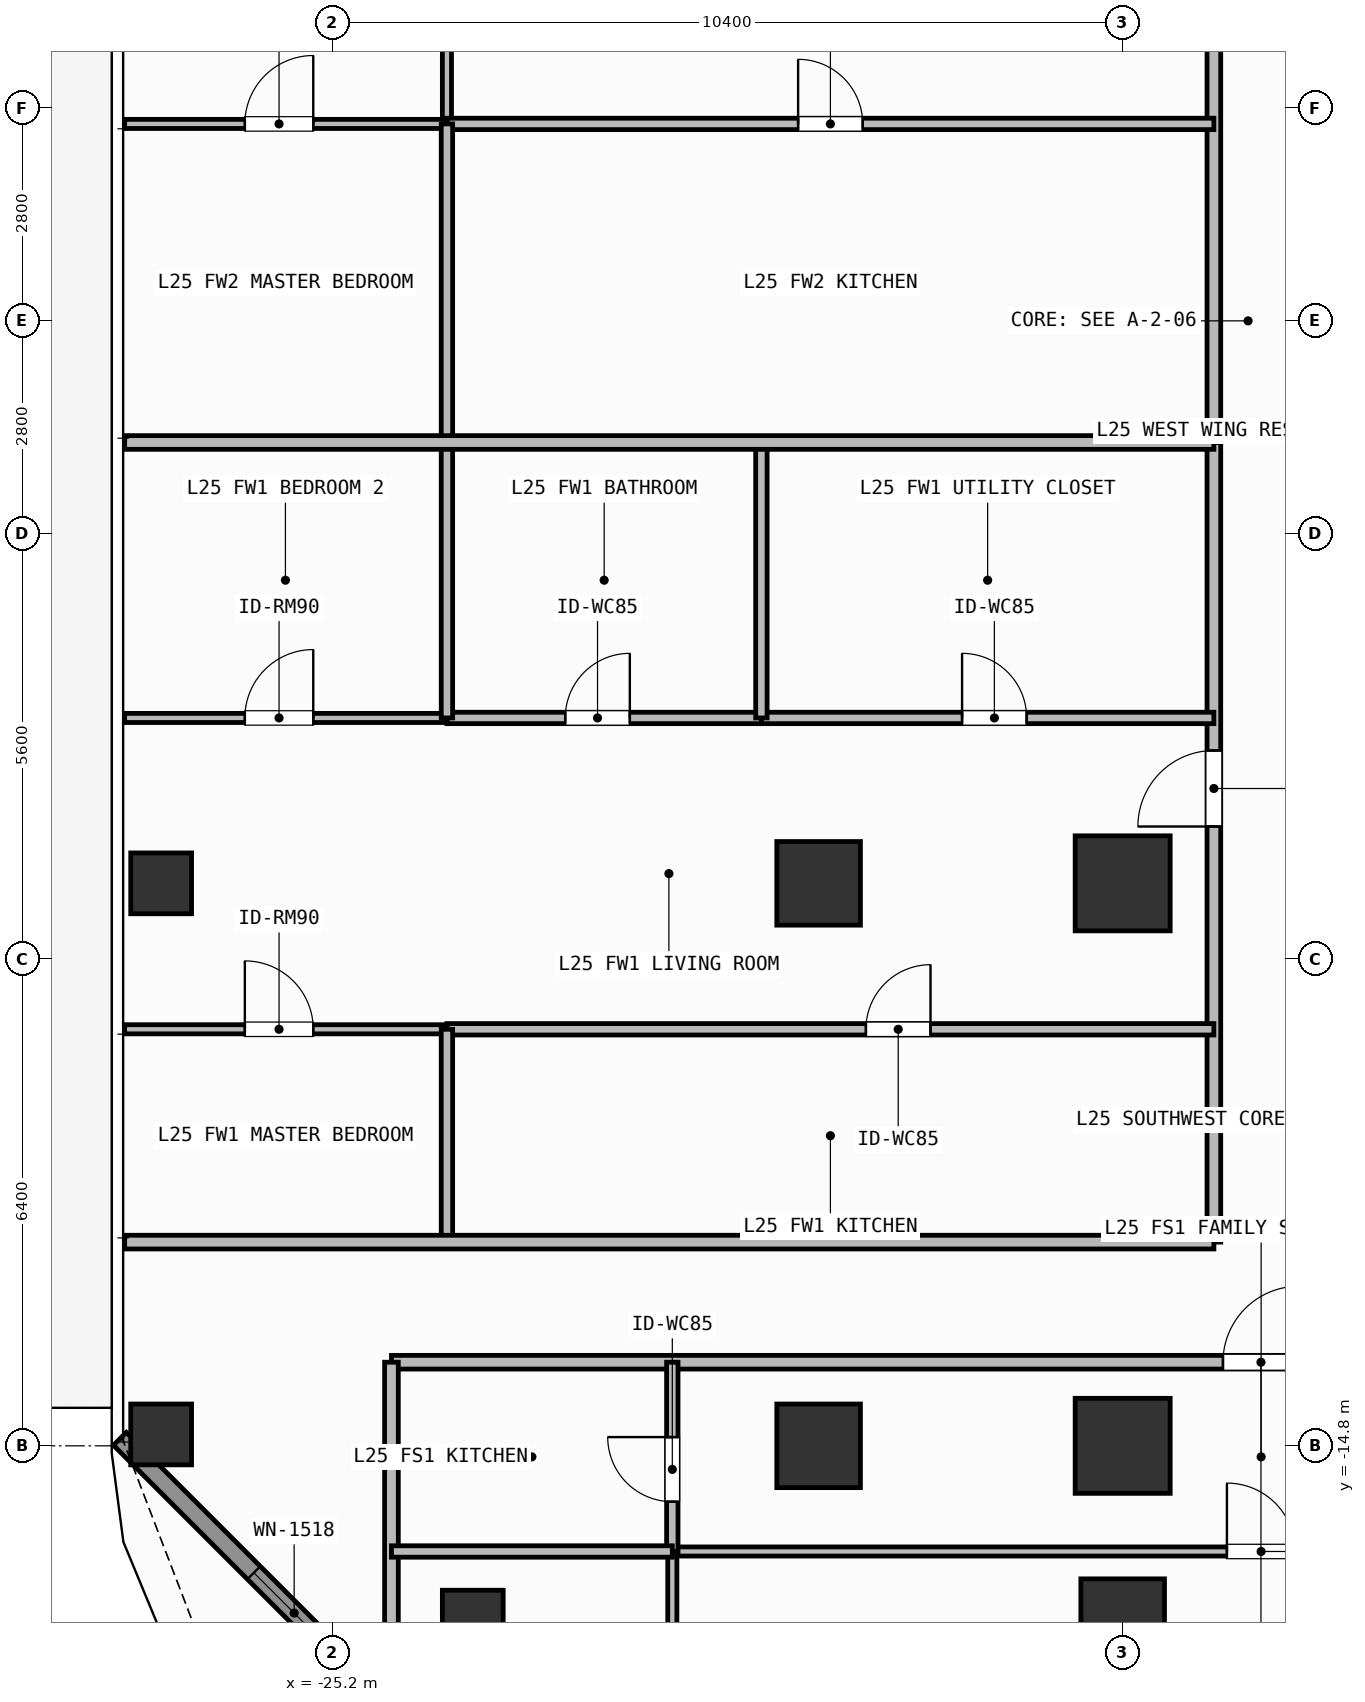
"""IFC4 building model, lengths in metres.
Left out: names, types, materials, properties, quantities, classifications, styles, units other than length and angle.
Written with IfcOpenShell. Run it as: python <this file> out.ifc"""

import sys

from ifc_helpers import new_model, si_unit, direction, frame, frame_2d, origin, origin_2d, place, context, subcontext, project, spatial, rectangle, hollow_rectangle, extrude, element, fill, save


model = new_model("IFC4")
c1 = context("Model", 3, precision=1e-05, world=origin(), true_north=direction((0.0, 1.0)))
c2 = subcontext(c1, "Body", "Model", "MODEL_VIEW")
j1 = project(units=[si_unit("LENGTHUNIT", "METRE"), si_unit("PLANEANGLEUNIT", "RADIAN")], contexts=[c1])
p1 = place(None, origin())
s1 = spatial("IfcSite", under=j1, at=p1, CompositionType="ELEMENT")
p2 = place(p1, origin())
s2 = spatial("IfcBuilding", under=s1, at=p2, CompositionType="ELEMENT")
p3 = place(p2, frame((0.0, 0.0, 100.8)))
s3 = spatial("IfcBuildingStorey", under=s2, at=p3, CompositionType="ELEMENT", Elevation=100.8)
for number, where, z_axis, x_axis in (
    (1, (-14.8, -14.8, 0.0), (0.0, 0.0, 1.0), (1.0, 0.0, 0.0)),
    (2, (-14.8, -7.4, 0.0), (0.0, 0.0, 1.0), (1.0, 0.0, 0.0)),
):
    element("IfcColumn", number, at=place(p3, frame(where, z_axis=z_axis, x_axis=x_axis)), inside=s3, PredefinedType="COLUMN", context=c2, shape_type="SweptSolid", body=[
        extrude(rectangle(XDim=1.25, YDim=1.25, at=origin_2d()), origin(), (0.0, 0.0, 1.0), 3.9),
    ])
for number, where, z_axis, x_axis in (
    (3, (-18.8, -14.8, 0.0), (0.0, 0.0, 1.0), (1.0, 0.0, 0.0)),
    (4, (-18.8, -7.4, 0.0), (0.0, 0.0, 1.0), (1.0, 0.0, 0.0)),
    (5, (-14.8, -17.1, 0.0), (0.0, 0.0, 1.0), (1.0, 0.0, 0.0)),
):
    element("IfcColumn", number, at=place(p3, frame(where, z_axis=z_axis, x_axis=x_axis)), inside=s3, PredefinedType="COLUMN", context=c2, shape_type="SweptSolid", body=[
        extrude(rectangle(XDim=1.1, YDim=1.1, at=origin_2d()), origin(), (0.0, 0.0, 1.0), 3.9),
    ])
for number, where, z_axis, x_axis in (
    (6, (-23.35, -17.1, 0.0), (0.0, 0.0, 1.0), (1.0, 0.0, 0.0)),
    (7, (-27.45, -14.65, 0.0), (0.0, 0.0, 1.0), (1.0, 0.0, 0.0)),
    (8, (-27.45, -7.4, 0.0), (0.0, 0.0, 1.0), (1.0, 0.0, 0.0)),
):
    element("IfcColumn", number, at=place(p3, frame(where, z_axis=z_axis, x_axis=x_axis)), inside=s3, PredefinedType="COLUMN", context=c2, shape_type="SweptSolid", body=[
        extrude(hollow_rectangle(XDim=0.8, YDim=0.8, WallThickness=0.036, at=origin_2d()), origin(), (0.0, 0.0, 1.0), 3.9),
    ])
p4 = place(p3, frame((-23.408, -19.292, 0.0), z_axis=(0.0, 0.0, 1.0), x_axis=(-0.707087954376, 0.707125607496, 0.0)))
e9 = element("IfcWall", 9, at=p4, inside=s3, PredefinedType="SOLIDWALL", context=c2, shape_type="SweptSolid", body=[
    extrude(rectangle(XDim=6.484, YDim=0.24, at=frame_2d((3.242, 0.0))), origin(), (0.0, 0.0, 1.0), 3.68),
])
p5 = place(p4, frame((2.492, 0.0, 0.8)))
e10 = element("IfcOpeningElement", 10, at=p5, cuts=e9, PredefinedType="OPENING", context=c2, shape_type="SweptSolid", body=[
    extrude(rectangle(XDim=1.5, YDim=1.85, at=frame_2d((0.75, 0.925))), frame((0.0, 0.13, 0.0), z_axis=(0.0, -1.0, 0.0), x_axis=(1.0, 0.0, 0.0)), (0.0, 0.0, 1.0), 0.26),
])
p6 = place(p3, frame((-24.42, -13.7, 0.0), z_axis=(0.0, 0.0, 1.0), x_axis=(1.0, 0.0, 0.0)))
e11 = element("IfcWall", 11, at=p6, inside=s3, PredefinedType="PARTITIONING", context=c2, shape_type="SweptSolid", body=[
    extrude(rectangle(XDim=25.394, YDim=0.18, at=frame_2d((12.697, 0.0))), origin(), (0.0, 0.0, 1.0), 3.68),
])
p7 = place(p6, frame((10.939, 0.0, 0.0)))
e12 = element("IfcOpeningElement", 12, at=p7, cuts=e11, PredefinedType="OPENING", context=c2, shape_type="SweptSolid", body=[
    extrude(rectangle(XDim=1.0, YDim=2.2, at=frame_2d((0.5, 1.1))), frame((0.0, 0.1, 0.0), z_axis=(0.0, -1.0, 0.0), x_axis=(1.0, 0.0, 0.0)), (0.0, 0.0, 1.0), 0.2),
])
p8 = place(p3, frame((-20.725, -16.19, 0.0), z_axis=(0.0, 0.0, 1.0), x_axis=(1.0, 0.0, 0.0)))
e13 = element("IfcWall", 13, at=p8, inside=s3, PredefinedType="PARTITIONING", context=c2, shape_type="SweptSolid", body=[
    extrude(rectangle(XDim=15.493, YDim=0.12, at=frame_2d((7.747, 0.0))), origin(), (0.0, 0.0, 1.0), 3.68),
])
p9 = place(p8, frame((7.296, 0.0, 0.0)))
e14 = element("IfcOpeningElement", 14, at=p9, cuts=e13, PredefinedType="OPENING", context=c2, shape_type="SweptSolid", body=[
    extrude(rectangle(XDim=0.9, YDim=2.1, at=frame_2d((0.45, 1.05))), frame((0.0, 0.07, 0.0), z_axis=(0.0, -1.0, 0.0), x_axis=(1.0, 0.0, 0.0)), (0.0, 0.0, 1.0), 0.14),
])
p10 = place(p3, frame((-20.725, -16.19, 0.0), z_axis=(0.0, 0.0, 1.0), x_axis=(0.0, 1.0, 0.0)))
e15 = element("IfcWall", 15, at=p10, inside=s3, PredefinedType="PARTITIONING", context=c2, shape_type="SweptSolid", body=[
    extrude(rectangle(XDim=2.49, YDim=0.15, at=frame_2d((1.245, 0.0))), origin(), (0.0, 0.0, 1.0), 3.68),
])
p11 = place(p10, frame((0.655, 0.0, 0.0)))
e16 = element("IfcOpeningElement", 16, at=p11, cuts=e15, PredefinedType="OPENING", context=c2, shape_type="SweptSolid", body=[
    extrude(rectangle(XDim=0.85, YDim=2.1, at=frame_2d((0.425, 1.05))), frame((0.0, 0.085, 0.0), z_axis=(0.0, -1.0, 0.0), x_axis=(1.0, 0.0, 0.0)), (0.0, 0.0, 1.0), 0.17),
])
p12 = place(p3, frame((-20.725, -19.23, 0.0), z_axis=(0.0, 0.0, 1.0), x_axis=(0.0, 1.0, 0.0)))
e17 = element("IfcWall", 17, at=p12, inside=s3, PredefinedType="PARTITIONING", context=c2, shape_type="SweptSolid", body=[
    extrude(rectangle(XDim=3.04, YDim=0.12, at=frame_2d((1.52, 0.0))), origin(), (0.0, 0.0, 1.0), 3.68),
])
p13 = place(p12, frame((1.153, 0.0, 0.0)))
e18 = element("IfcOpeningElement", 18, at=p13, cuts=e17, PredefinedType="OPENING", context=c2, shape_type="SweptSolid", body=[
    extrude(rectangle(XDim=0.9, YDim=2.1, at=frame_2d((0.45, 1.05))), frame((0.0, 0.07, 0.0), z_axis=(0.0, -1.0, 0.0), x_axis=(1.0, 0.0, 0.0)), (0.0, 0.0, 1.0), 0.14),
])
p14 = place(p3, frame((-13.6, -12.12, 0.0), z_axis=(0.0, 0.0, 1.0), x_axis=(0.0, 1.0, 0.0)))
e19 = element("IfcWall", 19, at=p14, inside=s3, PredefinedType="PARTITIONING", context=c2, shape_type="SweptSolid", body=[
    extrude(rectangle(XDim=10.52, YDim=0.18, at=frame_2d((5.26, 0.0))), origin(), (0.0, 0.0, 1.0), 3.68),
])
p15 = place(p14, frame((5.468, 0.0, 0.0)))
e20 = element("IfcOpeningElement", 20, at=p15, cuts=e19, PredefinedType="OPENING", context=c2, shape_type="SweptSolid", body=[
    extrude(rectangle(XDim=1.0, YDim=2.2, at=frame_2d((0.5, 1.1))), frame((0.0, 0.1, 0.0), z_axis=(0.0, -1.0, 0.0), x_axis=(1.0, 0.0, 0.0)), (0.0, 0.0, 1.0), 0.2),
])
p16 = place(p3, frame((-23.69, -5.224, 0.0), z_axis=(0.0, 0.0, 1.0), x_axis=(1.0, 0.0, 0.0)))
e21 = element("IfcWall", 21, at=p16, inside=s3, PredefinedType="PARTITIONING", context=c2, shape_type="SweptSolid", body=[
    extrude(rectangle(XDim=4.137, YDim=0.15, at=frame_2d((2.068, 0.0))), origin(), (0.0, 0.0, 1.0), 3.68),
])
p17 = place(p16, frame((1.556, 0.0, 0.0)))
e22 = element("IfcOpeningElement", 22, at=p17, cuts=e21, PredefinedType="OPENING", context=c2, shape_type="SweptSolid", body=[
    extrude(rectangle(XDim=0.85, YDim=2.1, at=frame_2d((0.425, 1.05))), frame((0.0, 0.085, 0.0), z_axis=(0.0, -1.0, 0.0), x_axis=(1.0, 0.0, 0.0)), (0.0, 0.0, 1.0), 0.17),
])
p18 = place(p3, frame((-19.553, -5.224, 0.0), z_axis=(0.0, 0.0, 1.0), x_axis=(1.0, 0.0, 0.0)))
e23 = element("IfcWall", 23, at=p18, inside=s3, PredefinedType="PARTITIONING", context=c2, shape_type="SweptSolid", body=[
    extrude(rectangle(XDim=5.953, YDim=0.15, at=frame_2d((2.977, 0.0))), origin(), (0.0, 0.0, 1.0), 3.68),
])
p19 = place(p18, frame((2.64, 0.0, 0.0)))
e24 = element("IfcOpeningElement", 24, at=p19, cuts=e23, PredefinedType="OPENING", context=c2, shape_type="SweptSolid", body=[
    extrude(rectangle(XDim=0.85, YDim=2.1, at=frame_2d((0.425, 1.05))), frame((0.0, 0.085, 0.0), z_axis=(0.0, -1.0, 0.0), x_axis=(1.0, 0.0, 0.0)), (0.0, 0.0, 1.0), 0.17),
])
p20 = place(p3, frame((-23.69, -9.32, 0.0), z_axis=(0.0, 0.0, 1.0), x_axis=(1.0, 0.0, 0.0)))
e25 = element("IfcWall", 25, at=p20, inside=s3, PredefinedType="PARTITIONING", context=c2, shape_type="SweptSolid", body=[
    extrude(rectangle(XDim=10.09, YDim=0.15, at=frame_2d((5.045, 0.0))), origin(), (0.0, 0.0, 1.0), 3.68),
])
p21 = place(p20, frame((5.512, 0.0, 0.0)))
e26 = element("IfcOpeningElement", 26, at=p21, cuts=e25, PredefinedType="OPENING", context=c2, shape_type="SweptSolid", body=[
    extrude(rectangle(XDim=0.85, YDim=2.1, at=frame_2d((0.425, 1.05))), frame((0.0, 0.085, 0.0), z_axis=(0.0, -1.0, 0.0), x_axis=(1.0, 0.0, 0.0)), (0.0, 0.0, 1.0), 0.17),
])
p22 = place(p3, frame((-27.93, -9.32, 0.0), z_axis=(0.0, 0.0, 1.0), x_axis=(1.0, 0.0, 0.0)))
e27 = element("IfcWall", 27, at=p22, inside=s3, PredefinedType="PARTITIONING", context=c2, shape_type="SweptSolid", body=[
    extrude(rectangle(XDim=4.24, YDim=0.12, at=frame_2d((2.12, 0.0))), origin(), (0.0, 0.0, 1.0), 3.68),
])
p23 = place(p22, frame((1.581, 0.0, 0.0)))
e28 = element("IfcOpeningElement", 28, at=p23, cuts=e27, PredefinedType="OPENING", context=c2, shape_type="SweptSolid", body=[
    extrude(rectangle(XDim=0.9, YDim=2.1, at=frame_2d((0.45, 1.05))), frame((0.0, 0.07, 0.0), z_axis=(0.0, -1.0, 0.0), x_axis=(1.0, 0.0, 0.0)), (0.0, 0.0, 1.0), 0.14),
])
p24 = place(p3, frame((-27.93, -5.224, 0.0), z_axis=(0.0, 0.0, 1.0), x_axis=(1.0, 0.0, 0.0)))
e29 = element("IfcWall", 29, at=p24, inside=s3, PredefinedType="PARTITIONING", context=c2, shape_type="SweptSolid", body=[
    extrude(rectangle(XDim=4.24, YDim=0.12, at=frame_2d((2.12, 0.0))), origin(), (0.0, 0.0, 1.0), 3.68),
])
p25 = place(p24, frame((1.581, 0.0, 0.0)))
e30 = element("IfcOpeningElement", 30, at=p25, cuts=e29, PredefinedType="OPENING", context=c2, shape_type="SweptSolid", body=[
    extrude(rectangle(XDim=0.9, YDim=2.1, at=frame_2d((0.45, 1.05))), frame((0.0, 0.07, 0.0), z_axis=(0.0, -1.0, 0.0), x_axis=(1.0, 0.0, 0.0)), (0.0, 0.0, 1.0), 0.14),
])
p26 = place(p3, frame((-13.6, -1.6, 0.0), z_axis=(0.0, 0.0, 1.0), x_axis=(0.0, 1.0, 0.0)))
e31 = element("IfcWall", 31, at=p26, inside=s3, PredefinedType="PARTITIONING", context=c2, shape_type="SweptSolid", body=[
    extrude(rectangle(XDim=13.72, YDim=0.18, at=frame_2d((6.86, 0.0))), origin(), (0.0, 0.0, 1.0), 3.68),
])
p27 = place(p26, frame((6.989, 0.0, 0.0)))
e32 = element("IfcOpeningElement", 32, at=p27, cuts=e31, PredefinedType="OPENING", context=c2, shape_type="SweptSolid", body=[
    extrude(rectangle(XDim=1.0, YDim=2.2, at=frame_2d((0.5, 1.1))), frame((0.0, 0.1, 0.0), z_axis=(0.0, -1.0, 0.0), x_axis=(1.0, 0.0, 0.0)), (0.0, 0.0, 1.0), 0.2),
])
p28 = place(p3, frame((-23.69, 2.591, 0.0), z_axis=(0.0, 0.0, 1.0), x_axis=(0.0, 1.0, 0.0)))
e33 = element("IfcWall", 33, at=p28, inside=s3, PredefinedType="PARTITIONING", context=c2, shape_type="SweptSolid", body=[
    extrude(rectangle(XDim=6.729, YDim=0.12, at=frame_2d((3.365, 0.0))), origin(), (0.0, 0.0, 1.0), 3.68),
])
p29 = place(p28, frame((2.826, 0.0, 0.0)))
e34 = element("IfcOpeningElement", 34, at=p29, cuts=e33, PredefinedType="OPENING", context=c2, shape_type="SweptSolid", body=[
    extrude(rectangle(XDim=0.9, YDim=2.1, at=frame_2d((0.45, 1.05))), frame((0.0, 0.07, 0.0), z_axis=(0.0, -1.0, 0.0), x_axis=(1.0, 0.0, 0.0)), (0.0, 0.0, 1.0), 0.14),
])
p30 = place(p3, frame((-23.69, 2.591, 0.0), z_axis=(0.0, 0.0, 1.0), x_axis=(1.0, 0.0, 0.0)))
e35 = element("IfcWall", 35, at=p30, inside=s3, PredefinedType="PARTITIONING", context=c2, shape_type="SweptSolid", body=[
    extrude(rectangle(XDim=10.09, YDim=0.15, at=frame_2d((5.045, 0.0))), origin(), (0.0, 0.0, 1.0), 3.68),
])
p31 = place(p30, frame((4.62, 0.0, 0.0)))
e36 = element("IfcOpeningElement", 36, at=p31, cuts=e35, PredefinedType="OPENING", context=c2, shape_type="SweptSolid", body=[
    extrude(rectangle(XDim=0.85, YDim=2.1, at=frame_2d((0.425, 1.05))), frame((0.0, 0.085, 0.0), z_axis=(0.0, -1.0, 0.0), x_axis=(1.0, 0.0, 0.0)), (0.0, 0.0, 1.0), 0.17),
])
p32 = place(p3, frame((-27.93, 2.591, 0.0), z_axis=(0.0, 0.0, 1.0), x_axis=(1.0, 0.0, 0.0)))
e37 = element("IfcWall", 37, at=p32, inside=s3, PredefinedType="PARTITIONING", context=c2, shape_type="SweptSolid", body=[
    extrude(rectangle(XDim=4.24, YDim=0.12, at=frame_2d((2.12, 0.0))), origin(), (0.0, 0.0, 1.0), 3.68),
])
p33 = place(p32, frame((1.581, 0.0, 0.0)))
e38 = element("IfcOpeningElement", 38, at=p33, cuts=e37, PredefinedType="OPENING", context=c2, shape_type="SweptSolid", body=[
    extrude(rectangle(XDim=0.9, YDim=2.1, at=frame_2d((0.45, 1.05))), frame((0.0, 0.07, 0.0), z_axis=(0.0, -1.0, 0.0), x_axis=(1.0, 0.0, 0.0)), (0.0, 0.0, 1.0), 0.14),
])
p34 = place(p3, frame((-24.42, -18.11, 0.0), z_axis=(0.0, 0.0, 1.0), x_axis=(0.0, 1.0, 0.0)))
e39 = element("IfcWall", 39, at=p34, inside=s3, PredefinedType="PARTITIONING", context=c2, shape_type="SweptSolid", body=[
    extrude(rectangle(XDim=4.41, YDim=0.18, at=frame_2d((2.205, 0.0))), origin(), (0.0, 0.0, 1.0), 3.68),
])
p35 = place(p3, frame((-24.42, -16.19, 0.0), z_axis=(0.0, 0.0, 1.0), x_axis=(1.0, 0.0, 0.0)))
e40 = element("IfcWall", 40, at=p35, inside=s3, PredefinedType="PARTITIONING", context=c2, shape_type="SweptSolid", body=[
    extrude(rectangle(XDim=3.695, YDim=0.15, at=frame_2d((1.847, 0.0))), origin(), (0.0, 0.0, 1.0), 3.68),
])
p36 = place(p3, frame((-19.553, -5.224, 0.0), z_axis=(0.0, 0.0, 1.0), x_axis=(0.0, 1.0, 0.0)))
e41 = element("IfcWall", 41, at=p36, inside=s3, PredefinedType="PARTITIONING", context=c2, shape_type="SweptSolid", body=[
    extrude(rectangle(XDim=3.624, YDim=0.15, at=frame_2d((1.812, 0.0))), origin(), (0.0, 0.0, 1.0), 3.68),
])
p37 = place(p3, frame((-23.69, -12.12, 0.0), z_axis=(0.0, 0.0, 1.0), x_axis=(0.0, 1.0, 0.0)))
e42 = element("IfcWall", 42, at=p37, inside=s3, PredefinedType="PARTITIONING", context=c2, shape_type="SweptSolid", body=[
    extrude(rectangle(XDim=2.8, YDim=0.15, at=frame_2d((1.4, 0.0))), origin(), (0.0, 0.0, 1.0), 3.68),
])
p38 = place(p3, frame((-23.69, -5.224, 0.0), z_axis=(0.0, 0.0, 1.0), x_axis=(0.0, 1.0, 0.0)))
e43 = element("IfcWall", 43, at=p38, inside=s3, PredefinedType="PARTITIONING", context=c2, shape_type="SweptSolid", body=[
    extrude(rectangle(XDim=3.624, YDim=0.15, at=frame_2d((1.812, 0.0))), origin(), (0.0, 0.0, 1.0), 3.68),
])
p39 = place(p3, frame((-23.69, -1.6, 0.0), z_axis=(0.0, 0.0, 1.0), x_axis=(0.0, 1.0, 0.0)))
e44 = element("IfcWall", 44, at=p39, inside=s3, PredefinedType="PARTITIONING", context=c2, shape_type="SweptSolid", body=[
    extrude(rectangle(XDim=4.191, YDim=0.15, at=frame_2d((2.096, 0.0))), origin(), (0.0, 0.0, 1.0), 3.68),
])
for number, where, z_axis, x_axis in (
    (45, (-27.93, -1.6, 0.0), (0.0, 0.0, 1.0), (1.0, 0.0, 0.0)),
    (46, (-27.93, -12.12, 0.0), (0.0, 0.0, 1.0), (1.0, 0.0, 0.0)),
):
    element("IfcWall", number, at=place(p3, frame(where, z_axis=z_axis, x_axis=x_axis)), inside=s3, PredefinedType="PARTITIONING", context=c2, shape_type="SweptSolid", body=[
        extrude(rectangle(XDim=14.33, YDim=0.18, at=frame_2d((7.165, 0.0))), origin(), (0.0, 0.0, 1.0), 3.68),
    ])
p40 = place(p5, origin())
e47 = element("IfcWindow", 47, at=p40, inside=s3, PartitioningType="SINGLE_PANEL", PredefinedType="WINDOW", context=c2, shape_type="SweptSolid", body=[
    extrude(rectangle(XDim=1.5, YDim=1.85, at=frame_2d((0.75, 0.925))), frame((0.0, 0.03, 0.0), z_axis=(0.0, -1.0, 0.0), x_axis=(1.0, 0.0, 0.0)), (0.0, 0.0, 1.0), 0.06),
])
fill(e10, e47)
p41 = place(p7, origin())
e48 = element("IfcDoor", 48, at=p41, inside=s3, OperationType="SINGLE_SWING_RIGHT", PredefinedType="DOOR", context=c2, shape_type="SweptSolid", body=[
    extrude(rectangle(XDim=1.0, YDim=2.2, at=frame_2d((0.5, 1.1))), frame((0.0, 0.025, 0.0), z_axis=(0.0, -1.0, 0.0), x_axis=(1.0, 0.0, 0.0)), (0.0, 0.0, 1.0), 0.05),
])
fill(e12, e48)
p42 = place(p9, origin())
e49 = element("IfcDoor", 49, at=p42, inside=s3, OperationType="SINGLE_SWING_LEFT", PredefinedType="DOOR", context=c2, shape_type="SweptSolid", body=[
    extrude(rectangle(XDim=0.9, YDim=2.1, at=frame_2d((0.45, 1.05))), frame((0.0, 0.025, 0.0), z_axis=(0.0, -1.0, 0.0), x_axis=(1.0, 0.0, 0.0)), (0.0, 0.0, 1.0), 0.05),
])
fill(e14, e49)
p43 = place(p11, origin())
e50 = element("IfcDoor", 50, at=p43, inside=s3, OperationType="SINGLE_SWING_RIGHT", PredefinedType="DOOR", context=c2, shape_type="SweptSolid", body=[
    extrude(rectangle(XDim=0.85, YDim=2.1, at=frame_2d((0.425, 1.05))), frame((0.0, 0.025, 0.0), z_axis=(0.0, -1.0, 0.0), x_axis=(1.0, 0.0, 0.0)), (0.0, 0.0, 1.0), 0.05),
])
fill(e16, e50)
p44 = place(p15, origin())
e51 = element("IfcDoor", 51, at=p44, inside=s3, OperationType="SINGLE_SWING_LEFT", PredefinedType="DOOR", context=c2, shape_type="SweptSolid", body=[
    extrude(rectangle(XDim=1.0, YDim=2.2, at=frame_2d((0.5, 1.1))), frame((0.0, 0.025, 0.0), z_axis=(0.0, -1.0, 0.0), x_axis=(1.0, 0.0, 0.0)), (0.0, 0.0, 1.0), 0.05),
])
fill(e20, e51)
p45 = place(p17, origin())
e52 = element("IfcDoor", 52, at=p45, inside=s3, OperationType="SINGLE_SWING_RIGHT", PredefinedType="DOOR", context=c2, shape_type="SweptSolid", body=[
    extrude(rectangle(XDim=0.85, YDim=2.1, at=frame_2d((0.425, 1.05))), frame((0.0, 0.025, 0.0), z_axis=(0.0, -1.0, 0.0), x_axis=(1.0, 0.0, 0.0)), (0.0, 0.0, 1.0), 0.05),
])
fill(e22, e52)
p46 = place(p19, origin())
e53 = element("IfcDoor", 53, at=p46, inside=s3, OperationType="SINGLE_SWING_LEFT", PredefinedType="DOOR", context=c2, shape_type="SweptSolid", body=[
    extrude(rectangle(XDim=0.85, YDim=2.1, at=frame_2d((0.425, 1.05))), frame((0.0, 0.025, 0.0), z_axis=(0.0, -1.0, 0.0), x_axis=(1.0, 0.0, 0.0)), (0.0, 0.0, 1.0), 0.05),
])
fill(e24, e53)
p47 = place(p21, origin())
e54 = element("IfcDoor", 54, at=p47, inside=s3, OperationType="SINGLE_SWING_RIGHT", PredefinedType="DOOR", context=c2, shape_type="SweptSolid", body=[
    extrude(rectangle(XDim=0.85, YDim=2.1, at=frame_2d((0.425, 1.05))), frame((0.0, 0.025, 0.0), z_axis=(0.0, -1.0, 0.0), x_axis=(1.0, 0.0, 0.0)), (0.0, 0.0, 1.0), 0.05),
])
fill(e26, e54)
p48 = place(p23, origin())
e55 = element("IfcDoor", 55, at=p48, inside=s3, OperationType="SINGLE_SWING_LEFT", PredefinedType="DOOR", context=c2, shape_type="SweptSolid", body=[
    extrude(rectangle(XDim=0.9, YDim=2.1, at=frame_2d((0.45, 1.05))), frame((0.0, 0.025, 0.0), z_axis=(0.0, -1.0, 0.0), x_axis=(1.0, 0.0, 0.0)), (0.0, 0.0, 1.0), 0.05),
])
fill(e28, e55)
p49 = place(p25, origin())
e56 = element("IfcDoor", 56, at=p49, inside=s3, OperationType="SINGLE_SWING_RIGHT", PredefinedType="DOOR", context=c2, shape_type="SweptSolid", body=[
    extrude(rectangle(XDim=0.9, YDim=2.1, at=frame_2d((0.45, 1.05))), frame((0.0, 0.025, 0.0), z_axis=(0.0, -1.0, 0.0), x_axis=(1.0, 0.0, 0.0)), (0.0, 0.0, 1.0), 0.05),
])
fill(e30, e56)
p50 = place(p31, origin())
e57 = element("IfcDoor", 57, at=p50, inside=s3, OperationType="SINGLE_SWING_LEFT", PredefinedType="DOOR", context=c2, shape_type="SweptSolid", body=[
    extrude(rectangle(XDim=0.85, YDim=2.1, at=frame_2d((0.425, 1.05))), frame((0.0, 0.025, 0.0), z_axis=(0.0, -1.0, 0.0), x_axis=(1.0, 0.0, 0.0)), (0.0, 0.0, 1.0), 0.05),
])
fill(e36, e57)
p51 = place(p33, origin())
e58 = element("IfcDoor", 58, at=p51, inside=s3, OperationType="SINGLE_SWING_RIGHT", PredefinedType="DOOR", context=c2, shape_type="SweptSolid", body=[
    extrude(rectangle(XDim=0.9, YDim=2.1, at=frame_2d((0.45, 1.05))), frame((0.0, 0.025, 0.0), z_axis=(0.0, -1.0, 0.0), x_axis=(1.0, 0.0, 0.0)), (0.0, 0.0, 1.0), 0.05),
])
fill(e38, e58)
save(model, sys.argv[1])
